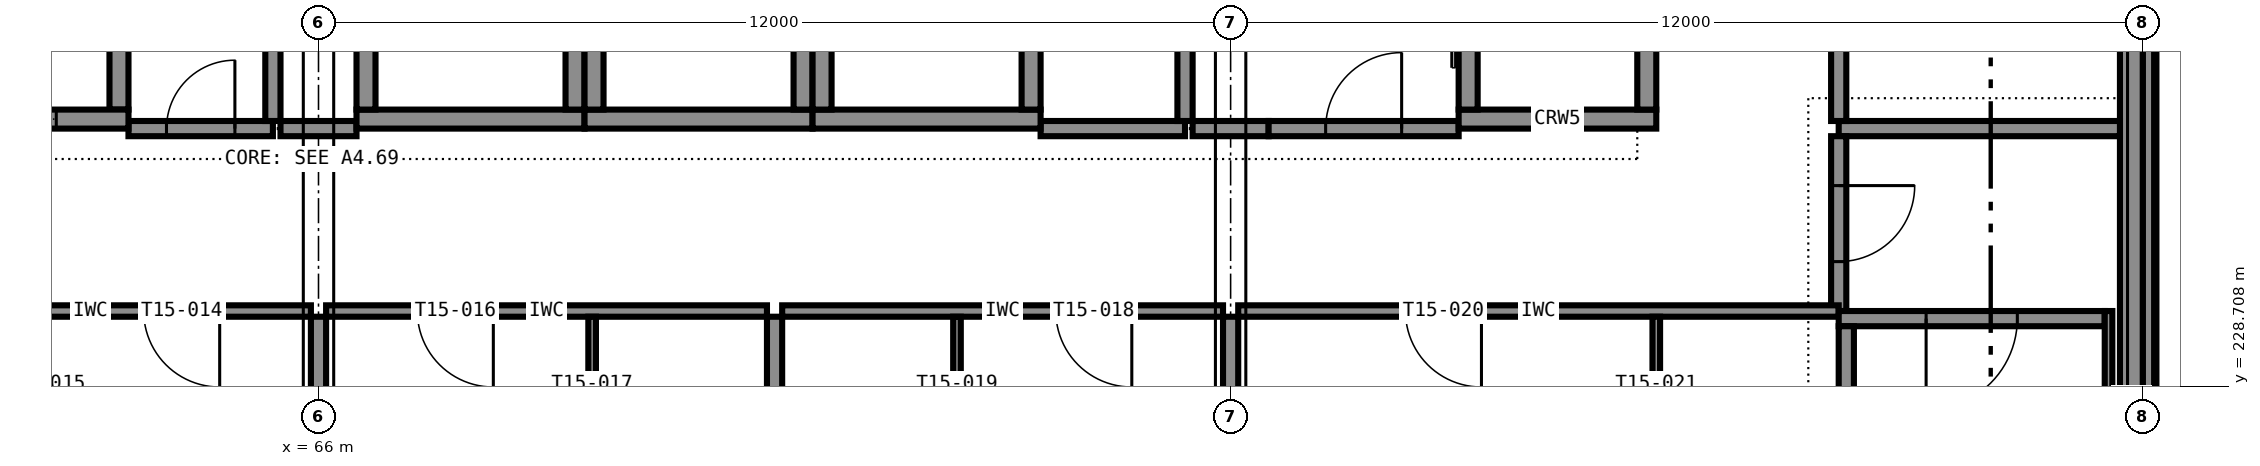
"""IFC4 building model, lengths in metres.
Left out: names, types, materials, properties, quantities, classifications, styles, units other than length and angle.
Written with IfcOpenShell. Run it as: python <this file> out.ifc"""

import sys

from ifc_helpers import new_model, si_unit, direction, frame, frame_2d, origin, place, context, subcontext, project, spatial, rectangle, extrude, element, fill, save


model = new_model("IFC4")
c1 = context("Model", 3, precision=1e-05, world=origin(), true_north=direction((0.0, 1.0)))
c2 = subcontext(c1, "Body", "Model", "MODEL_VIEW")
j1 = project(units=[si_unit("LENGTHUNIT", "METRE"), si_unit("PLANEANGLEUNIT", "RADIAN")], contexts=[c1])
p1 = place(None, origin())
s1 = spatial("IfcSite", under=j1, at=p1, CompositionType="ELEMENT")
p2 = place(p1, origin())
s2 = spatial("IfcBuilding", under=s1, at=p2, CompositionType="ELEMENT")
p3 = place(p2, frame((0.0, 0.0, 60.6)))
s3 = spatial("IfcBuildingStorey", under=s2, at=p3, CompositionType="ELEMENT", Elevation=60.6)
p4 = place(p3, frame((60.5, 232.225, 0.0), z_axis=(0.0, 0.0, 1.0), x_axis=(1.0, 0.0, 0.0)))
e1 = element("IfcWall", 1, at=p4, inside=s3, PredefinedType="SHEAR", context=c2, shape_type="SweptSolid", body=[
    extrude(rectangle(XDim=3.0, YDim=0.25, at=frame_2d((1.5, 0.0))), origin(), (0.0, 0.0, 1.0), 3.6),
])
p5 = place(p4, frame((0.95, 0.0, 0.0)))
e2 = element("IfcOpeningElement", 2, at=p5, cuts=e1, PredefinedType="OPENING", context=c2, shape_type="SweptSolid", body=[
    extrude(rectangle(XDim=1.1, YDim=2.1, at=frame_2d((0.55, 1.05))), frame((0.0, 0.135, 0.0), z_axis=(0.0, -1.0, 0.0), x_axis=(1.0, 0.0, 0.0)), (0.0, 0.0, 1.0), 0.27),
])
p6 = place(p3, frame((63.375, 232.35, 0.0), z_axis=(0.0, 0.0, 1.0), x_axis=(0.0, 1.0, 0.0)))
e3 = element("IfcWall", 3, at=p6, inside=s3, PredefinedType="SHEAR", context=c2, shape_type="SweptSolid", body=[
    extrude(rectangle(XDim=3.3, YDim=0.25, at=frame_2d((1.65, 0.0))), origin(), (0.0, 0.0, 1.0), 3.6),
])
p7 = place(p3, frame((66.5, 232.225, 0.0), z_axis=(0.0, 0.0, 1.0), x_axis=(1.0, 0.0, 0.0)))
e4 = element("IfcWall", 4, at=p7, inside=s3, PredefinedType="SHEAR", context=c2, shape_type="SweptSolid", body=[
    extrude(rectangle(XDim=3.0, YDim=0.25, at=frame_2d((1.5, 0.0))), origin(), (0.0, 0.0, 1.0), 3.6),
])
for number, where, z_axis, x_axis in (
    (5, (66.625, 232.35, 0.0), (0.0, 0.0, 1.0), (0.0, 1.0, 0.0)),
    (6, (69.375, 232.35, 0.0), (0.0, 0.0, 1.0), (0.0, 1.0, 0.0)),
):
    element("IfcWall", number, at=place(p3, frame(where, z_axis=z_axis, x_axis=x_axis)), inside=s3, PredefinedType="SHEAR", context=c2, shape_type="SweptSolid", body=[
        extrude(rectangle(XDim=3.3, YDim=0.25, at=frame_2d((1.65, 0.0))), origin(), (0.0, 0.0, 1.0), 3.6),
    ])
p8 = place(p3, frame((69.5, 232.225, 0.0), z_axis=(0.0, 0.0, 1.0), x_axis=(1.0, 0.0, 0.0)))
e7 = element("IfcWall", 7, at=p8, inside=s3, PredefinedType="SHEAR", context=c2, shape_type="SweptSolid", body=[
    extrude(rectangle(XDim=3.0, YDim=0.25, at=frame_2d((1.5, 0.0))), origin(), (0.0, 0.0, 1.0), 3.6),
])
for number, where, z_axis, x_axis in (
    (8, (69.625, 232.35, 0.0), (0.0, 0.0, 1.0), (0.0, 1.0, 0.0)),
    (9, (72.375, 232.35, 0.0), (0.0, 0.0, 1.0), (0.0, 1.0, 0.0)),
):
    element("IfcWall", number, at=place(p3, frame(where, z_axis=z_axis, x_axis=x_axis)), inside=s3, PredefinedType="SHEAR", context=c2, shape_type="SweptSolid", body=[
        extrude(rectangle(XDim=3.3, YDim=0.25, at=frame_2d((1.65, 0.0))), origin(), (0.0, 0.0, 1.0), 3.6),
    ])
p9 = place(p3, frame((72.5, 232.225, 0.0), z_axis=(0.0, 0.0, 1.0), x_axis=(1.0, 0.0, 0.0)))
e10 = element("IfcWall", 10, at=p9, inside=s3, PredefinedType="SHEAR", context=c2, shape_type="SweptSolid", body=[
    extrude(rectangle(XDim=3.0, YDim=0.25, at=frame_2d((1.5, 0.0))), origin(), (0.0, 0.0, 1.0), 3.6),
])
for number, where, z_axis, x_axis in (
    (11, (72.625, 232.35, 0.0), (0.0, 0.0, 1.0), (0.0, 1.0, 0.0)),
    (12, (75.375, 232.35, 0.0), (0.0, 0.0, 1.0), (0.0, 1.0, 0.0)),
):
    element("IfcWall", number, at=place(p3, frame(where, z_axis=z_axis, x_axis=x_axis)), inside=s3, PredefinedType="SHEAR", context=c2, shape_type="SweptSolid", body=[
        extrude(rectangle(XDim=3.3, YDim=0.25, at=frame_2d((1.65, 0.0))), origin(), (0.0, 0.0, 1.0), 3.6),
    ])
p10 = place(p3, frame((81.0, 232.225, 0.0), z_axis=(0.0, 0.0, 1.0), x_axis=(1.0, 0.0, 0.0)))
e13 = element("IfcWall", 13, at=p10, inside=s3, PredefinedType="SHEAR", context=c2, shape_type="SweptSolid", body=[
    extrude(rectangle(XDim=2.6, YDim=0.25, at=frame_2d((1.3, 0.0))), origin(), (0.0, 0.0, 1.0), 3.6),
])
p11 = place(p3, frame((81.125, 232.35, 0.0), z_axis=(0.0, 0.0, 1.0), x_axis=(0.0, 1.0, 0.0)))
e14 = element("IfcWall", 14, at=p11, inside=s3, PredefinedType="SHEAR", context=c2, shape_type="SweptSolid", body=[
    extrude(rectangle(XDim=3.3, YDim=0.25, at=frame_2d((1.65, 0.0))), origin(), (0.0, 0.0, 1.0), 3.6),
])
p12 = place(p11, frame((1.1, 0.0, 0.0)))
e15 = element("IfcOpeningElement", 15, at=p12, cuts=e14, PredefinedType="OPENING", context=c2, shape_type="SweptSolid", body=[
    extrude(rectangle(XDim=1.1, YDim=2.1, at=frame_2d((0.55, 1.05))), frame((0.0, 0.135, 0.0), z_axis=(0.0, -1.0, 0.0), x_axis=(1.0, 0.0, 0.0)), (0.0, 0.0, 1.0), 0.27),
])
p13 = place(p3, frame((83.475, 232.35, 0.0), z_axis=(0.0, 0.0, 1.0), x_axis=(0.0, 1.0, 0.0)))
e16 = element("IfcWall", 16, at=p13, inside=s3, PredefinedType="SHEAR", context=c2, shape_type="SweptSolid", body=[
    extrude(rectangle(XDim=3.3, YDim=0.25, at=frame_2d((1.65, 0.0))), origin(), (0.0, 0.0, 1.0), 3.6),
])
p14 = place(p3, frame((89.5, 229.6, 0.0), z_axis=(0.0, 0.0, 1.0), x_axis=(-1.0, 0.0, 0.0)))
e17 = element("IfcWall", 17, at=p14, inside=s3, PredefinedType="SHEAR", context=c2, shape_type="SweptSolid", body=[
    extrude(rectangle(XDim=3.5, YDim=0.2, at=frame_2d((1.75, 0.0))), origin(), (0.0, 0.0, 1.0), 3.6),
])
p15 = place(p14, frame((1.15, 0.0, 0.0)))
e18 = element("IfcOpeningElement", 18, at=p15, cuts=e17, PredefinedType="OPENING", context=c2, shape_type="SweptSolid", body=[
    extrude(rectangle(XDim=1.2, YDim=2.1, at=frame_2d((0.6, 1.05))), frame((0.0, 0.11, 0.0), z_axis=(0.0, -1.0, 0.0), x_axis=(1.0, 0.0, 0.0)), (0.0, 0.0, 1.0), 0.22),
])
p16 = place(p3, frame((86.1, 222.0, 0.0), z_axis=(0.0, 0.0, 1.0), x_axis=(0.0, 1.0, 0.0)))
e19 = element("IfcWall", 19, at=p16, inside=s3, PredefinedType="SHEAR", context=c2, shape_type="SweptSolid", body=[
    extrude(rectangle(XDim=7.5, YDim=0.2, at=frame_2d((3.75, 0.0))), origin(), (0.0, 0.0, 1.0), 3.6),
])
p17 = place(p3, frame((89.55, 229.7, 0.0), z_axis=(0.0, 0.0, 1.0), x_axis=(0.0, -1.0, 0.0)))
e20 = element("IfcWall", 20, at=p17, inside=s3, PredefinedType="SHEAR", context=c2, shape_type="SweptSolid", body=[
    extrude(rectangle(XDim=7.7, YDim=0.1, at=frame_2d((3.85, 0.0))), origin(), (0.0, 0.0, 1.0), 3.4),
])
p18 = place(p3, frame((89.85, 222.35, 0.0), z_axis=(0.0, 0.0, 1.0), x_axis=(0.0, 1.0, 0.0)))
e21 = element("IfcWall", 21, at=p18, inside=s3, PredefinedType="STANDARD", context=c2, shape_type="SweptSolid", body=[
    extrude(rectangle(XDim=11.3, YDim=0.3, at=frame_2d((5.65, 0.0))), origin(), (0.0, 0.0, 1.0), 2.6),
])
p19 = place(p3, frame((90.075, 222.35, 3.4), z_axis=(0.0, 0.0, 1.0), x_axis=(0.0, 1.0, 0.0)))
e22 = element("IfcWall", 22, at=p19, inside=s3, PredefinedType="STANDARD", context=c2, shape_type="SweptSolid", body=[
    extrude(rectangle(XDim=11.3, YDim=0.15, at=frame_2d((5.65, 0.0))), origin(), (0.0, 0.0, 1.0), 0.2),
])
p20 = place(p3, frame((63.5, 232.1, 0.0), z_axis=(0.0, 0.0, 1.0), x_axis=(1.0, 0.0, 0.0)))
e23 = element("IfcWall", 23, at=p20, inside=s3, PredefinedType="PARTITIONING", context=c2, shape_type="SweptSolid", body=[
    extrude(rectangle(XDim=1.9, YDim=0.2, at=frame_2d((0.95, 0.0))), origin(), (0.0, 0.0, 1.0), 3.4),
])
p21 = place(p20, frame((0.5, 0.0, 0.0)))
e24 = element("IfcOpeningElement", 24, at=p21, cuts=e23, PredefinedType="OPENING", context=c2, shape_type="SweptSolid", body=[
    extrude(rectangle(XDim=0.9, YDim=2.1, at=frame_2d((0.45, 1.05))), frame((0.0, 0.11, 0.0), z_axis=(0.0, -1.0, 0.0), x_axis=(1.0, 0.0, 0.0)), (0.0, 0.0, 1.0), 0.22),
])
p22 = place(p3, frame((65.5, 232.1, 0.0), z_axis=(0.0, 0.0, 1.0), x_axis=(1.0, 0.0, 0.0)))
e25 = element("IfcWall", 25, at=p22, inside=s3, PredefinedType="PARTITIONING", context=c2, shape_type="SweptSolid", body=[
    extrude(rectangle(XDim=1.0, YDim=0.2, at=frame_2d((0.5, 0.0))), origin(), (0.0, 0.0, 1.0), 3.4),
])
p23 = place(p3, frame((75.5, 232.1, 0.0), z_axis=(0.0, 0.0, 1.0), x_axis=(1.0, 0.0, 0.0)))
e26 = element("IfcWall", 26, at=p23, inside=s3, PredefinedType="PARTITIONING", context=c2, shape_type="SweptSolid", body=[
    extrude(rectangle(XDim=1.9, YDim=0.2, at=frame_2d((0.95, 0.0))), origin(), (0.0, 0.0, 1.0), 3.4),
])
p24 = place(p3, frame((77.5, 232.1, 0.0), z_axis=(0.0, 0.0, 1.0), x_axis=(1.0, 0.0, 0.0)))
e27 = element("IfcWall", 27, at=p24, inside=s3, PredefinedType="PARTITIONING", context=c2, shape_type="SweptSolid", body=[
    extrude(rectangle(XDim=1.0, YDim=0.2, at=frame_2d((0.5, 0.0))), origin(), (0.0, 0.0, 1.0), 3.4),
])
p25 = place(p3, frame((78.5, 232.1, 0.0), z_axis=(0.0, 0.0, 1.0), x_axis=(1.0, 0.0, 0.0)))
e28 = element("IfcWall", 28, at=p25, inside=s3, PredefinedType="PARTITIONING", context=c2, shape_type="SweptSolid", body=[
    extrude(rectangle(XDim=2.5, YDim=0.2, at=frame_2d((1.25, 0.0))), origin(), (0.0, 0.0, 1.0), 3.4),
])
p26 = place(p25, frame((0.75, 0.0, 0.0)))
e29 = element("IfcOpeningElement", 29, at=p26, cuts=e28, PredefinedType="OPENING", context=c2, shape_type="SweptSolid", body=[
    extrude(rectangle(XDim=1.0, YDim=2.1, at=frame_2d((0.5, 1.05))), frame((0.0, 0.11, 0.0), z_axis=(0.0, -1.0, 0.0), x_axis=(1.0, 0.0, 0.0)), (0.0, 0.0, 1.0), 0.22),
])
p27 = place(p3, frame((86.0, 232.1, 0.0), z_axis=(0.0, 0.0, 1.0), x_axis=(1.0, 0.0, 0.0)))
e30 = element("IfcWall", 30, at=p27, inside=s3, PredefinedType="PARTITIONING", context=c2, shape_type="SweptSolid", body=[
    extrude(rectangle(XDim=3.7, YDim=0.2, at=frame_2d((1.85, 0.0))), origin(), (0.0, 0.0, 1.0), 3.4),
])
for number, where, z_axis, x_axis in (
    (31, (65.4, 232.2, 0.0), (0.0, 0.0, 1.0), (0.0, 1.0, 0.0)),
    (32, (77.4, 232.2, 0.0), (0.0, 0.0, 1.0), (0.0, 1.0, 0.0)),
):
    element("IfcWall", number, at=place(p3, frame(where, z_axis=z_axis, x_axis=x_axis)), inside=s3, PredefinedType="PARTITIONING", context=c2, shape_type="SweptSolid", body=[
        extrude(rectangle(XDim=3.6, YDim=0.2, at=frame_2d((1.8, 0.0))), origin(), (0.0, 0.0, 1.0), 3.4),
    ])
p28 = place(p3, frame((86.0, 235.8, 0.0), z_axis=(0.0, 0.0, 1.0), x_axis=(0.0, -1.0, 0.0)))
e33 = element("IfcWall", 33, at=p28, inside=s3, PredefinedType="PARTITIONING", context=c2, shape_type="SweptSolid", body=[
    extrude(rectangle(XDim=3.6, YDim=0.2, at=frame_2d((1.8, 0.0))), origin(), (0.0, 0.0, 1.0), 3.4),
])
p29 = place(p28, frame((1.35, 0.0, 0.0)))
e34 = element("IfcOpeningElement", 34, at=p29, cuts=e33, PredefinedType="OPENING", context=c2, shape_type="SweptSolid", body=[
    extrude(rectangle(XDim=0.9, YDim=2.1, at=frame_2d((0.45, 1.05))), frame((0.0, 0.11, 0.0), z_axis=(0.0, -1.0, 0.0), x_axis=(1.0, 0.0, 0.0)), (0.0, 0.0, 1.0), 0.22),
])
p30 = place(p3, frame((86.0, 232.0, 0.0), z_axis=(0.0, 0.0, 1.0), x_axis=(0.0, -1.0, 0.0)))
e35 = element("IfcWall", 35, at=p30, inside=s3, PredefinedType="PARTITIONING", context=c2, shape_type="SweptSolid", body=[
    extrude(rectangle(XDim=2.3, YDim=0.2, at=frame_2d((1.15, 0.0))), origin(), (0.0, 0.0, 1.0), 3.4),
])
p31 = place(p30, frame((0.65, 0.0, 0.0)))
e36 = element("IfcOpeningElement", 36, at=p31, cuts=e35, PredefinedType="OPENING", context=c2, shape_type="SweptSolid", body=[
    extrude(rectangle(XDim=1.0, YDim=2.1, at=frame_2d((0.5, 1.05))), frame((0.0, 0.11, 0.0), z_axis=(0.0, -1.0, 0.0), x_axis=(1.0, 0.0, 0.0)), (0.0, 0.0, 1.0), 0.22),
])
p32 = place(p3, frame((65.9, 229.7, 0.0), z_axis=(0.0, 0.0, 1.0), x_axis=(-1.0, 0.0, 0.0)))
e37 = element("IfcWall", 37, at=p32, inside=s3, PredefinedType="PARTITIONING", context=c2, shape_type="SweptSolid", body=[
    extrude(rectangle(XDim=5.8, YDim=0.15, at=frame_2d((2.9, 0.0))), origin(), (0.0, 0.0, 1.0), 3.4),
])
p33 = place(p32, frame((1.2, 0.0, 0.0)))
e38 = element("IfcOpeningElement", 38, at=p33, cuts=e37, PredefinedType="OPENING", context=c2, shape_type="SweptSolid", body=[
    extrude(rectangle(XDim=1.0, YDim=2.1, at=frame_2d((0.5, 1.05))), frame((0.0, 0.085, 0.0), z_axis=(0.0, -1.0, 0.0), x_axis=(1.0, 0.0, 0.0)), (0.0, 0.0, 1.0), 0.17),
])
p34 = place(p3, frame((71.9, 229.7, 0.0), z_axis=(0.0, 0.0, 1.0), x_axis=(-1.0, 0.0, 0.0)))
e39 = element("IfcWall", 39, at=p34, inside=s3, PredefinedType="PARTITIONING", context=c2, shape_type="SweptSolid", body=[
    extrude(rectangle(XDim=5.8, YDim=0.15, at=frame_2d((2.9, 0.0))), origin(), (0.0, 0.0, 1.0), 3.4),
])
p35 = place(p34, frame((3.6, 0.0, 0.0)))
e40 = element("IfcOpeningElement", 40, at=p35, cuts=e39, PredefinedType="OPENING", context=c2, shape_type="SweptSolid", body=[
    extrude(rectangle(XDim=1.0, YDim=2.1, at=frame_2d((0.5, 1.05))), frame((0.0, 0.085, 0.0), z_axis=(0.0, -1.0, 0.0), x_axis=(1.0, 0.0, 0.0)), (0.0, 0.0, 1.0), 0.17),
])
p36 = place(p3, frame((69.6, 226.75, 0.0), z_axis=(0.0, 0.0, 1.0), x_axis=(0.0, 1.0, 0.0)))
e41 = element("IfcWall", 41, at=p36, inside=s3, PredefinedType="PARTITIONING", context=c2, shape_type="SweptSolid", body=[
    extrude(rectangle(XDim=2.875, YDim=0.1, at=frame_2d((1.438, 0.0))), origin(), (0.0, 0.0, 1.0), 3.4),
])
p37 = place(p36, frame((1.038, 0.0, 0.0)))
e42 = element("IfcOpeningElement", 42, at=p37, cuts=e41, PredefinedType="OPENING", context=c2, shape_type="SweptSolid", body=[
    extrude(rectangle(XDim=0.8, YDim=2.1, at=frame_2d((0.4, 1.05))), frame((0.0, 0.06, 0.0), z_axis=(0.0, -1.0, 0.0), x_axis=(1.0, 0.0, 0.0)), (0.0, 0.0, 1.0), 0.12),
])
p38 = place(p3, frame((77.9, 229.7, 0.0), z_axis=(0.0, 0.0, 1.0), x_axis=(-1.0, 0.0, 0.0)))
e43 = element("IfcWall", 43, at=p38, inside=s3, PredefinedType="PARTITIONING", context=c2, shape_type="SweptSolid", body=[
    extrude(rectangle(XDim=5.8, YDim=0.15, at=frame_2d((2.9, 0.0))), origin(), (0.0, 0.0, 1.0), 3.4),
])
p39 = place(p38, frame((1.2, 0.0, 0.0)))
e44 = element("IfcOpeningElement", 44, at=p39, cuts=e43, PredefinedType="OPENING", context=c2, shape_type="SweptSolid", body=[
    extrude(rectangle(XDim=1.0, YDim=2.1, at=frame_2d((0.5, 1.05))), frame((0.0, 0.085, 0.0), z_axis=(0.0, -1.0, 0.0), x_axis=(1.0, 0.0, 0.0)), (0.0, 0.0, 1.0), 0.17),
])
p40 = place(p3, frame((74.4, 229.625, 0.0), z_axis=(0.0, 0.0, 1.0), x_axis=(0.0, -1.0, 0.0)))
e45 = element("IfcWall", 45, at=p40, inside=s3, PredefinedType="PARTITIONING", context=c2, shape_type="SweptSolid", body=[
    extrude(rectangle(XDim=2.875, YDim=0.1, at=frame_2d((1.438, 0.0))), origin(), (0.0, 0.0, 1.0), 3.4),
])
p41 = place(p40, frame((1.038, 0.0, 0.0)))
e46 = element("IfcOpeningElement", 46, at=p41, cuts=e45, PredefinedType="OPENING", context=c2, shape_type="SweptSolid", body=[
    extrude(rectangle(XDim=0.8, YDim=2.1, at=frame_2d((0.4, 1.05))), frame((0.0, 0.06, 0.0), z_axis=(0.0, -1.0, 0.0), x_axis=(1.0, 0.0, 0.0)), (0.0, 0.0, 1.0), 0.12),
])
p42 = place(p3, frame((86.0, 229.7, 0.0), z_axis=(0.0, 0.0, 1.0), x_axis=(-1.0, 0.0, 0.0)))
e47 = element("IfcWall", 47, at=p42, inside=s3, PredefinedType="PARTITIONING", context=c2, shape_type="SweptSolid", body=[
    extrude(rectangle(XDim=7.9, YDim=0.15, at=frame_2d((3.95, 0.0))), origin(), (0.0, 0.0, 1.0), 3.4),
])
p43 = place(p42, frame((4.7, 0.0, 0.0)))
e48 = element("IfcOpeningElement", 48, at=p43, cuts=e47, PredefinedType="OPENING", context=c2, shape_type="SweptSolid", body=[
    extrude(rectangle(XDim=1.0, YDim=2.1, at=frame_2d((0.5, 1.05))), frame((0.0, 0.085, 0.0), z_axis=(0.0, -1.0, 0.0), x_axis=(1.0, 0.0, 0.0)), (0.0, 0.0, 1.0), 0.17),
])
p44 = place(p3, frame((83.6, 226.75, 0.0), z_axis=(0.0, 0.0, 1.0), x_axis=(0.0, 1.0, 0.0)))
e49 = element("IfcWall", 49, at=p44, inside=s3, PredefinedType="PARTITIONING", context=c2, shape_type="SweptSolid", body=[
    extrude(rectangle(XDim=2.875, YDim=0.1, at=frame_2d((1.438, 0.0))), origin(), (0.0, 0.0, 1.0), 3.4),
])
p45 = place(p44, frame((1.038, 0.0, 0.0)))
e50 = element("IfcOpeningElement", 50, at=p45, cuts=e49, PredefinedType="OPENING", context=c2, shape_type="SweptSolid", body=[
    extrude(rectangle(XDim=0.8, YDim=2.1, at=frame_2d((0.4, 1.05))), frame((0.0, 0.06, 0.0), z_axis=(0.0, -1.0, 0.0), x_axis=(1.0, 0.0, 0.0)), (0.0, 0.0, 1.0), 0.12),
])
p46 = place(p3, frame((66.0, 222.35, 0.0), z_axis=(0.0, 0.0, 1.0), x_axis=(0.0, 1.0, 0.0)))
e51 = element("IfcWall", 51, at=p46, inside=s3, PredefinedType="PARTITIONING", context=c2, shape_type="SweptSolid", body=[
    extrude(rectangle(XDim=7.275, YDim=0.2, at=frame_2d((3.637, 0.0))), origin(), (0.0, 0.0, 1.0), 2.6),
])
p47 = place(p3, frame((72.0, 222.3, 0.0), z_axis=(0.0, 0.0, 1.0), x_axis=(0.0, 1.0, 0.0)))
e52 = element("IfcWall", 52, at=p47, inside=s3, PredefinedType="PARTITIONING", context=c2, shape_type="SweptSolid", body=[
    extrude(rectangle(XDim=7.325, YDim=0.2, at=frame_2d((3.663, 0.0))), origin(), (0.0, 0.0, 1.0), 3.4),
])
p48 = place(p3, frame((78.0, 222.35, 0.0), z_axis=(0.0, 0.0, 1.0), x_axis=(0.0, 1.0, 0.0)))
e53 = element("IfcWall", 53, at=p48, inside=s3, PredefinedType="PARTITIONING", context=c2, shape_type="SweptSolid", body=[
    extrude(rectangle(XDim=7.275, YDim=0.2, at=frame_2d((3.637, 0.0))), origin(), (0.0, 0.0, 1.0), 2.6),
])
p49 = place(p21, origin())
e54 = element("IfcDoor", 54, at=p49, inside=s3, OperationType="SINGLE_SWING_RIGHT", PredefinedType="DOOR", context=c2, shape_type="SweptSolid", body=[
    extrude(rectangle(XDim=0.9, YDim=2.1, at=frame_2d((0.45, 1.05))), frame((0.0, 0.025, 0.0), z_axis=(0.0, -1.0, 0.0), x_axis=(1.0, 0.0, 0.0)), (0.0, 0.0, 1.0), 0.05),
])
fill(e24, e54)
p50 = place(p26, origin())
e55 = element("IfcDoor", 55, at=p50, inside=s3, OperationType="SINGLE_SWING_RIGHT", PredefinedType="DOOR", context=c2, shape_type="SweptSolid", body=[
    extrude(rectangle(XDim=1.0, YDim=2.1, at=frame_2d((0.5, 1.05))), frame((0.0, 0.025, 0.0), z_axis=(0.0, -1.0, 0.0), x_axis=(1.0, 0.0, 0.0)), (0.0, 0.0, 1.0), 0.05),
])
fill(e29, e55)
p51 = place(p31, origin())
e56 = element("IfcDoor", 56, at=p51, inside=s3, OperationType="SINGLE_SWING_LEFT", PredefinedType="DOOR", context=c2, shape_type="SweptSolid", body=[
    extrude(rectangle(XDim=1.0, YDim=2.1, at=frame_2d((0.5, 1.05))), frame((0.0, 0.025, 0.0), z_axis=(0.0, -1.0, 0.0), x_axis=(1.0, 0.0, 0.0)), (0.0, 0.0, 1.0), 0.05),
])
fill(e36, e56)
p52 = place(p33, origin())
e57 = element("IfcDoor", 57, at=p52, inside=s3, OperationType="SINGLE_SWING_LEFT", PredefinedType="DOOR", context=c2, shape_type="SweptSolid", body=[
    extrude(rectangle(XDim=1.0, YDim=2.1, at=frame_2d((0.5, 1.05))), frame((0.0, 0.025, 0.0), z_axis=(0.0, -1.0, 0.0), x_axis=(1.0, 0.0, 0.0)), (0.0, 0.0, 1.0), 0.05),
])
fill(e38, e57)
p53 = place(p35, origin())
e58 = element("IfcDoor", 58, at=p53, inside=s3, OperationType="SINGLE_SWING_LEFT", PredefinedType="DOOR", context=c2, shape_type="SweptSolid", body=[
    extrude(rectangle(XDim=1.0, YDim=2.1, at=frame_2d((0.5, 1.05))), frame((0.0, 0.025, 0.0), z_axis=(0.0, -1.0, 0.0), x_axis=(1.0, 0.0, 0.0)), (0.0, 0.0, 1.0), 0.05),
])
fill(e40, e58)
p54 = place(p39, origin())
e59 = element("IfcDoor", 59, at=p54, inside=s3, OperationType="SINGLE_SWING_LEFT", PredefinedType="DOOR", context=c2, shape_type="SweptSolid", body=[
    extrude(rectangle(XDim=1.0, YDim=2.1, at=frame_2d((0.5, 1.05))), frame((0.0, 0.025, 0.0), z_axis=(0.0, -1.0, 0.0), x_axis=(1.0, 0.0, 0.0)), (0.0, 0.0, 1.0), 0.05),
])
fill(e44, e59)
p55 = place(p43, origin())
e60 = element("IfcDoor", 60, at=p55, inside=s3, OperationType="SINGLE_SWING_LEFT", PredefinedType="DOOR", context=c2, shape_type="SweptSolid", body=[
    extrude(rectangle(XDim=1.0, YDim=2.1, at=frame_2d((0.5, 1.05))), frame((0.0, 0.025, 0.0), z_axis=(0.0, -1.0, 0.0), x_axis=(1.0, 0.0, 0.0)), (0.0, 0.0, 1.0), 0.05),
])
fill(e48, e60)
p56 = place(p5, origin())
e61 = element("IfcDoor", 61, at=p56, inside=s3, OperationType="SLIDING_TO_LEFT", PredefinedType="DOOR", context=c2, shape_type="SweptSolid", body=[
    extrude(rectangle(XDim=1.1, YDim=2.1, at=frame_2d((0.55, 1.05))), frame((0.0, 0.025, 0.0), z_axis=(0.0, -1.0, 0.0), x_axis=(1.0, 0.0, 0.0)), (0.0, 0.0, 1.0), 0.05),
])
fill(e2, e61)
p57 = place(p15, origin())
e62 = element("IfcDoor", 62, at=p57, inside=s3, OperationType="SINGLE_SWING_RIGHT", PredefinedType="DOOR", context=c2, shape_type="SweptSolid", body=[
    extrude(rectangle(XDim=1.2, YDim=2.1, at=frame_2d((0.6, 1.05))), frame((0.0, 0.025, 0.0), z_axis=(0.0, -1.0, 0.0), x_axis=(1.0, 0.0, 0.0)), (0.0, 0.0, 1.0), 0.05),
])
fill(e18, e62)
save(model, sys.argv[1])
